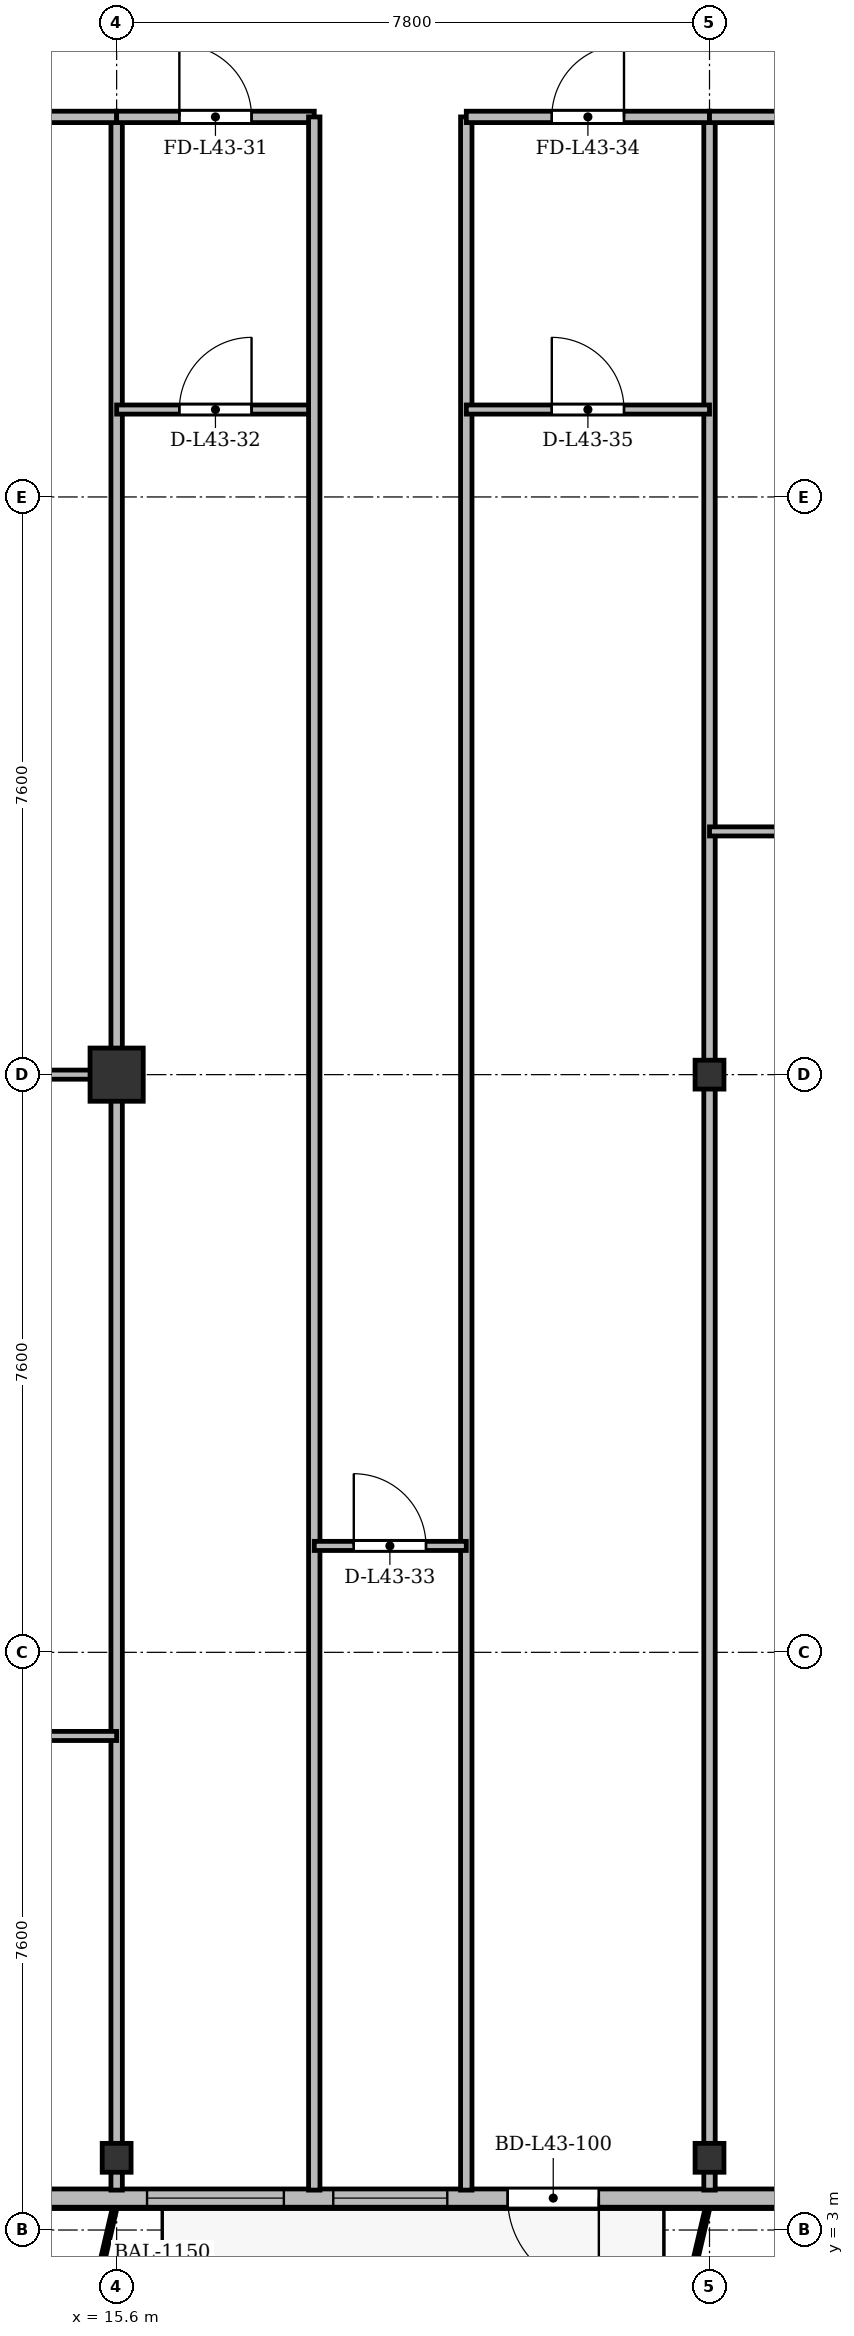
"""IFC4 building model, lengths in metres.
Left out: names, types, materials, properties, quantities, classifications, styles, units other than length and angle.
Written with IfcOpenShell. Run it as: python <this file> out.ifc"""

import sys

from ifc_helpers import new_model, si_unit, direction, frame, frame_2d, origin, origin_2d, place, context, subcontext, project, spatial, rectangle, i_section, extrude, source, transform, mapped, element, fill, save


model = new_model("IFC4")
c1 = context("Model", 3, precision=1e-05, world=origin(), true_north=direction((0.0, 1.0)))
c2 = subcontext(c1, "Body", "Model", "MODEL_VIEW")
j1 = project(units=[si_unit("LENGTHUNIT", "METRE"), si_unit("PLANEANGLEUNIT", "RADIAN")], contexts=[c1])
p1 = place(None, origin())
s1 = spatial("IfcSite", under=j1, at=p1, CompositionType="ELEMENT")
p2 = place(p1, origin())
s2 = spatial("IfcBuilding", under=s1, at=p2, CompositionType="ELEMENT")
p3 = place(p2, frame((0.0, 0.0, 164.5)))
s3 = spatial("IfcBuildingStorey", under=s2, at=p3, CompositionType="ELEMENT", Elevation=164.5)
m1 = source(origin(), c2, "Body", "SweptSolid", [
    extrude(i_section(OverallWidth=0.38, OverallDepth=0.38, WebThickness=0.02, FlangeThickness=0.03, at=origin_2d()), origin(), (0.0, 0.0, 1.0), 3.6),
])
p4 = place(p3, frame((15.6, 3.95, 0.0), z_axis=(0.0, 0.0, 1.0), x_axis=(1.0, 0.0, 0.0)))
e1 = element("IfcColumn", 1, at=p4, inside=s3, PredefinedType="COLUMN", context=c2, shape_type="MappedRepresentation", body=[
    mapped(m1, transform((0.0, 0.0, 0.0), x_axis=(1.0, 0.0, 0.0), y_axis=(0.0, 1.0, 0.0), z_axis=(0.0, 0.0, 1.0), scale=1.0)),
])
m2 = source(origin(), c2, "Body", "SweptSolid", [
    extrude(rectangle(XDim=0.7, YDim=0.7, at=origin_2d()), origin(), (0.0, 0.0, 1.0), 3.6),
])
p5 = place(p3, frame((15.6, 18.2, 0.0), z_axis=(0.0, 0.0, 1.0), x_axis=(1.0, 0.0, 0.0)))
e2 = element("IfcColumn", 2, at=p5, inside=s3, PredefinedType="COLUMN", context=c2, shape_type="MappedRepresentation", body=[
    mapped(m2, transform((0.0, 0.0, 0.0), x_axis=(1.0, 0.0, 0.0), y_axis=(0.0, 1.0, 0.0), z_axis=(0.0, 0.0, 1.0), scale=1.0)),
])
for number, where, z_axis, x_axis in (
    (3, (23.4, 3.95, 0.0), (0.0, 0.0, 1.0), (1.0, 0.0, 0.0)),
    (4, (23.4, 18.2, 0.0), (0.0, 0.0, 1.0), (1.0, 0.0, 0.0)),
):
    element("IfcColumn", number, at=place(p3, frame(where, z_axis=z_axis, x_axis=x_axis)), inside=s3, PredefinedType="COLUMN", context=c2, shape_type="MappedRepresentation", body=[
        mapped(m1, transform((0.0, 0.0, 0.0), x_axis=(1.0, 0.0, 0.0), y_axis=(0.0, 1.0, 0.0), z_axis=(0.0, 0.0, 1.0), scale=1.0)),
    ])
p6 = place(p3, frame((63.6, 3.42, 0.0), z_axis=(0.0, 0.0, 1.0), x_axis=(-1.0, 0.0, 0.0)))
e5 = element("IfcWall", 5, at=p6, inside=s3, PredefinedType="SOLIDWALL", context=c2, shape_type="SweptSolid", body=[
    extrude(rectangle(XDim=52.8, YDim=0.24, at=frame_2d((26.4, 0.0))), origin(), (0.0, 0.0, 1.0), 3.35),
])
p7 = place(p6, frame((1.445, 0.0, 0.9)))
e6 = element("IfcOpeningElement", 6, at=p7, cuts=e5, PredefinedType="OPENING", context=c2, shape_type="SweptSolid", body=[
    extrude(rectangle(XDim=2.0, YDim=1.95, at=frame_2d((1.0, 0.975))), frame((0.0, 0.13, 0.0), z_axis=(0.0, -1.0, 0.0), x_axis=(1.0, 0.0, 0.0)), (0.0, 0.0, 1.0), 0.26),
])
p8 = place(p6, frame((5.275, 0.0, 0.9)))
e7 = element("IfcOpeningElement", 7, at=p8, cuts=e5, PredefinedType="OPENING", context=c2, shape_type="SweptSolid", body=[
    extrude(rectangle(XDim=1.65, YDim=1.85, at=frame_2d((0.825, 0.925))), frame((0.0, 0.13, 0.0), z_axis=(0.0, -1.0, 0.0), x_axis=(1.0, 0.0, 0.0)), (0.0, 0.0, 1.0), 0.26),
])
p9 = place(p6, frame((7.65, 0.0, 0.9)))
e8 = element("IfcOpeningElement", 8, at=p9, cuts=e5, PredefinedType="OPENING", context=c2, shape_type="SweptSolid", body=[
    extrude(rectangle(XDim=1.5, YDim=1.75, at=frame_2d((0.75, 0.875))), frame((0.0, 0.13, 0.0), z_axis=(0.0, -1.0, 0.0), x_axis=(1.0, 0.0, 0.0)), (0.0, 0.0, 1.0), 0.26),
])
p10 = place(p6, frame((9.9, 0.0, 0.9)))
e9 = element("IfcOpeningElement", 9, at=p10, cuts=e5, PredefinedType="OPENING", context=c2, shape_type="SweptSolid", body=[
    extrude(rectangle(XDim=2.2, YDim=1.8, at=frame_2d((1.1, 0.9))), frame((0.0, 0.13, 0.0), z_axis=(0.0, -1.0, 0.0), x_axis=(1.0, 0.0, 0.0)), (0.0, 0.0, 1.0), 0.26),
])
p11 = place(p6, frame((13.62, 0.0, 0.0)))
e10 = element("IfcOpeningElement", 10, at=p11, cuts=e5, PredefinedType="OPENING", context=c2, shape_type="SweptSolid", body=[
    extrude(rectangle(XDim=1.2, YDim=2.2, at=frame_2d((0.6, 1.1))), frame((0.0, 0.13, 0.0), z_axis=(0.0, -1.0, 0.0), x_axis=(1.0, 0.0, 0.0)), (0.0, 0.0, 1.0), 0.26),
])
p12 = place(p6, frame((15.45, 0.0, 0.9)))
e11 = element("IfcOpeningElement", 11, at=p12, cuts=e5, PredefinedType="OPENING", context=c2, shape_type="SweptSolid", body=[
    extrude(rectangle(XDim=1.5, YDim=1.75, at=frame_2d((0.75, 0.875))), frame((0.0, 0.13, 0.0), z_axis=(0.0, -1.0, 0.0), x_axis=(1.0, 0.0, 0.0)), (0.0, 0.0, 1.0), 0.26),
])
p13 = place(p6, frame((17.775, 0.0, 0.9)))
e12 = element("IfcOpeningElement", 12, at=p13, cuts=e5, PredefinedType="OPENING", context=c2, shape_type="SweptSolid", body=[
    extrude(rectangle(XDim=1.65, YDim=1.85, at=frame_2d((0.825, 0.925))), frame((0.0, 0.13, 0.0), z_axis=(0.0, -1.0, 0.0), x_axis=(1.0, 0.0, 0.0)), (0.0, 0.0, 1.0), 0.26),
])
p14 = place(p6, frame((22.2, 0.0, 0.9)))
e13 = element("IfcOpeningElement", 13, at=p14, cuts=e5, PredefinedType="OPENING", context=c2, shape_type="SweptSolid", body=[
    extrude(rectangle(XDim=1.8, YDim=1.8, at=frame_2d((0.9, 0.9))), frame((0.0, 0.13, 0.0), z_axis=(0.0, -1.0, 0.0), x_axis=(1.0, 0.0, 0.0)), (0.0, 0.0, 1.0), 0.26),
])
p15 = place(p6, frame((28.6, 0.0, 0.9)))
e14 = element("IfcOpeningElement", 14, at=p15, cuts=e5, PredefinedType="OPENING", context=c2, shape_type="SweptSolid", body=[
    extrude(rectangle(XDim=2.2, YDim=1.8, at=frame_2d((1.1, 0.9))), frame((0.0, 0.13, 0.0), z_axis=(0.0, -1.0, 0.0), x_axis=(1.0, 0.0, 0.0)), (0.0, 0.0, 1.0), 0.26),
])
p16 = place(p6, frame((35.85, 0.0, 0.9)))
e15 = element("IfcOpeningElement", 15, at=p16, cuts=e5, PredefinedType="OPENING", context=c2, shape_type="SweptSolid", body=[
    extrude(rectangle(XDim=1.5, YDim=1.75, at=frame_2d((0.75, 0.875))), frame((0.0, 0.13, 0.0), z_axis=(0.0, -1.0, 0.0), x_axis=(1.0, 0.0, 0.0)), (0.0, 0.0, 1.0), 0.26),
])
p17 = place(p6, frame((41.656, 0.0, 0.0)))
e16 = element("IfcOpeningElement", 16, at=p17, cuts=e5, PredefinedType="OPENING", context=c2, shape_type="SweptSolid", body=[
    extrude(rectangle(XDim=1.2, YDim=2.2, at=frame_2d((0.6, 1.1))), frame((0.0, 0.13, 0.0), z_axis=(0.0, -1.0, 0.0), x_axis=(1.0, 0.0, 0.0)), (0.0, 0.0, 1.0), 0.26),
])
p18 = place(p6, frame((43.65, 0.0, 0.9)))
e17 = element("IfcOpeningElement", 17, at=p18, cuts=e5, PredefinedType="OPENING", context=c2, shape_type="SweptSolid", body=[
    extrude(rectangle(XDim=1.5, YDim=1.75, at=frame_2d((0.75, 0.875))), frame((0.0, 0.13, 0.0), z_axis=(0.0, -1.0, 0.0), x_axis=(1.0, 0.0, 0.0)), (0.0, 0.0, 1.0), 0.26),
])
p19 = place(p6, frame((45.8, 0.0, 0.9)))
e18 = element("IfcOpeningElement", 18, at=p19, cuts=e5, PredefinedType="OPENING", context=c2, shape_type="SweptSolid", body=[
    extrude(rectangle(XDim=1.8, YDim=1.8, at=frame_2d((0.9, 0.9))), frame((0.0, 0.13, 0.0), z_axis=(0.0, -1.0, 0.0), x_axis=(1.0, 0.0, 0.0)), (0.0, 0.0, 1.0), 0.26),
])
p20 = place(p6, frame((49.255, 0.0, 0.9)))
e19 = element("IfcOpeningElement", 19, at=p20, cuts=e5, PredefinedType="OPENING", context=c2, shape_type="SweptSolid", body=[
    extrude(rectangle(XDim=2.2, YDim=1.8, at=frame_2d((1.1, 0.9))), frame((0.0, 0.13, 0.0), z_axis=(0.0, -1.0, 0.0), x_axis=(1.0, 0.0, 0.0)), (0.0, 0.0, 1.0), 0.26),
])
for number, where, z_axis, x_axis in (
    (20, (15.6, 3.525, 0.0), (0.0, 0.0, 1.0), (0.0, 1.0, 0.0)),
    (21, (23.4, 3.525, 0.0), (0.0, 0.0, 1.0), (0.0, 1.0, 0.0)),
):
    element("IfcWall", number, at=place(p3, frame(where, z_axis=z_axis, x_axis=x_axis)), inside=s3, PredefinedType="PARTITIONING", context=c2, shape_type="SweptSolid", body=[
        extrude(rectangle(XDim=27.275, YDim=0.15, at=frame_2d((13.638, 0.0))), origin(), (0.0, 0.0, 1.0), 2.85),
    ])
p21 = place(p3, frame((8.04, 18.2, 0.0), z_axis=(0.0, 0.0, 1.0), x_axis=(1.0, 0.0, 0.0)))
e22 = element("IfcWall", 22, at=p21, inside=s3, PredefinedType="PARTITIONING", context=c2, shape_type="SweptSolid", body=[
    extrude(rectangle(XDim=7.56, YDim=0.12, at=frame_2d((3.78, 0.0))), origin(), (0.0, 0.0, 1.0), 2.75),
])
p22 = place(p21, frame((3.305, 0.0, 0.0)))
e23 = element("IfcOpeningElement", 23, at=p22, cuts=e22, PredefinedType="OPENING", context=c2, shape_type="SweptSolid", body=[
    extrude(rectangle(XDim=0.95, YDim=2.15, at=frame_2d((0.475, 1.075))), frame((0.0, 0.07, 0.0), z_axis=(0.0, -1.0, 0.0), x_axis=(1.0, 0.0, 0.0)), (0.0, 0.0, 1.0), 0.14),
])
p23 = place(p3, frame((8.025, 30.8, 0.0), z_axis=(0.0, 0.0, 1.0), x_axis=(1.0, 0.0, 0.0)))
e24 = element("IfcWall", 24, at=p23, inside=s3, PredefinedType="PARTITIONING", context=c2, shape_type="SweptSolid", body=[
    extrude(rectangle(XDim=7.575, YDim=0.15, at=frame_2d((3.788, 0.0))), origin(), (0.0, 0.0, 1.0), 2.85),
])
p24 = place(p23, frame((5.073, 0.0, 0.0)))
e25 = element("IfcOpeningElement", 25, at=p24, cuts=e24, PredefinedType="OPENING", context=c2, shape_type="SweptSolid", body=[
    extrude(rectangle(XDim=0.95, YDim=2.15, at=frame_2d((0.475, 1.075))), frame((0.0, 0.085, 0.0), z_axis=(0.0, -1.0, 0.0), x_axis=(1.0, 0.0, 0.0)), (0.0, 0.0, 1.0), 0.17),
])
p25 = place(p3, frame((8.04, 9.5, 0.0), z_axis=(0.0, 0.0, 1.0), x_axis=(1.0, 0.0, 0.0)))
e26 = element("IfcWall", 26, at=p25, inside=s3, PredefinedType="PARTITIONING", context=c2, shape_type="SweptSolid", body=[
    extrude(rectangle(XDim=7.56, YDim=0.12, at=frame_2d((3.78, 0.0))), origin(), (0.0, 0.0, 1.0), 2.85),
])
p26 = place(p25, frame((3.305, 0.0, 0.0)))
e27 = element("IfcOpeningElement", 27, at=p26, cuts=e26, PredefinedType="OPENING", context=c2, shape_type="SweptSolid", body=[
    extrude(rectangle(XDim=0.95, YDim=2.15, at=frame_2d((0.475, 1.075))), frame((0.0, 0.07, 0.0), z_axis=(0.0, -1.0, 0.0), x_axis=(1.0, 0.0, 0.0)), (0.0, 0.0, 1.0), 0.14),
])
p27 = place(p3, frame((15.6, 30.8, 0.0), z_axis=(0.0, 0.0, 1.0), x_axis=(1.0, 0.0, 0.0)))
e28 = element("IfcWall", 28, at=p27, inside=s3, PredefinedType="PARTITIONING", context=c2, shape_type="SweptSolid", body=[
    extrude(rectangle(XDim=2.6, YDim=0.15, at=frame_2d((1.3, 0.0))), origin(), (0.0, 0.0, 1.0), 2.85),
])
p28 = place(p27, frame((0.825, 0.0, 0.0)))
e29 = element("IfcOpeningElement", 29, at=p28, cuts=e28, PredefinedType="OPENING", context=c2, shape_type="SweptSolid", body=[
    extrude(rectangle(XDim=0.95, YDim=2.15, at=frame_2d((0.475, 1.075))), frame((0.0, 0.085, 0.0), z_axis=(0.0, -1.0, 0.0), x_axis=(1.0, 0.0, 0.0)), (0.0, 0.0, 1.0), 0.17),
])
p29 = place(p3, frame((15.6, 26.95, 0.0), z_axis=(0.0, 0.0, 1.0), x_axis=(1.0, 0.0, 0.0)))
e30 = element("IfcWall", 30, at=p29, inside=s3, PredefinedType="PARTITIONING", context=c2, shape_type="SweptSolid", body=[
    extrude(rectangle(XDim=2.6, YDim=0.12, at=frame_2d((1.3, 0.0))), origin(), (0.0, 0.0, 1.0), 2.85),
])
p30 = place(p29, frame((0.825, 0.0, 0.0)))
e31 = element("IfcOpeningElement", 31, at=p30, cuts=e30, PredefinedType="OPENING", context=c2, shape_type="SweptSolid", body=[
    extrude(rectangle(XDim=0.95, YDim=2.15, at=frame_2d((0.475, 1.075))), frame((0.0, 0.07, 0.0), z_axis=(0.0, -1.0, 0.0), x_axis=(1.0, 0.0, 0.0)), (0.0, 0.0, 1.0), 0.14),
])
for number, where, z_axis, x_axis in (
    (32, (18.2, 3.525, 0.0), (0.0, 0.0, 1.0), (0.0, 1.0, 0.0)),
    (33, (20.2, 3.525, 0.0), (0.0, 0.0, 1.0), (0.0, 1.0, 0.0)),
):
    element("IfcWall", number, at=place(p3, frame(where, z_axis=z_axis, x_axis=x_axis)), inside=s3, PredefinedType="PARTITIONING", context=c2, shape_type="SweptSolid", body=[
        extrude(rectangle(XDim=27.275, YDim=0.15, at=frame_2d((13.638, 0.0))), origin(), (0.0, 0.0, 1.0), 2.75),
    ])
p31 = place(p3, frame((18.2, 12.0, 0.0), z_axis=(0.0, 0.0, 1.0), x_axis=(1.0, 0.0, 0.0)))
e34 = element("IfcWall", 34, at=p31, inside=s3, PredefinedType="PARTITIONING", context=c2, shape_type="SweptSolid", body=[
    extrude(rectangle(XDim=2.0, YDim=0.12, at=frame_2d((1.0, 0.0))), origin(), (0.0, 0.0, 1.0), 3.35),
])
p32 = place(p31, frame((0.52, 0.0, 0.0)))
e35 = element("IfcOpeningElement", 35, at=p32, cuts=e34, PredefinedType="OPENING", context=c2, shape_type="SweptSolid", body=[
    extrude(rectangle(XDim=0.95, YDim=2.15, at=frame_2d((0.475, 1.075))), frame((0.0, 0.07, 0.0), z_axis=(0.0, -1.0, 0.0), x_axis=(1.0, 0.0, 0.0)), (0.0, 0.0, 1.0), 0.14),
])
p33 = place(p3, frame((20.2, 30.8, 0.0), z_axis=(0.0, 0.0, 1.0), x_axis=(1.0, 0.0, 0.0)))
e36 = element("IfcWall", 36, at=p33, inside=s3, PredefinedType="PARTITIONING", context=c2, shape_type="SweptSolid", body=[
    extrude(rectangle(XDim=3.2, YDim=0.15, at=frame_2d((1.6, 0.0))), origin(), (0.0, 0.0, 1.0), 2.85),
])
p34 = place(p33, frame((1.125, 0.0, 0.0)))
e37 = element("IfcOpeningElement", 37, at=p34, cuts=e36, PredefinedType="OPENING", context=c2, shape_type="SweptSolid", body=[
    extrude(rectangle(XDim=0.95, YDim=2.15, at=frame_2d((0.475, 1.075))), frame((0.0, 0.085, 0.0), z_axis=(0.0, -1.0, 0.0), x_axis=(1.0, 0.0, 0.0)), (0.0, 0.0, 1.0), 0.17),
])
p35 = place(p3, frame((20.2, 26.95, 0.0), z_axis=(0.0, 0.0, 1.0), x_axis=(1.0, 0.0, 0.0)))
e38 = element("IfcWall", 38, at=p35, inside=s3, PredefinedType="PARTITIONING", context=c2, shape_type="SweptSolid", body=[
    extrude(rectangle(XDim=3.2, YDim=0.12, at=frame_2d((1.6, 0.0))), origin(), (0.0, 0.0, 1.0), 2.85),
])
p36 = place(p35, frame((1.125, 0.0, 0.0)))
e39 = element("IfcOpeningElement", 39, at=p36, cuts=e38, PredefinedType="OPENING", context=c2, shape_type="SweptSolid", body=[
    extrude(rectangle(XDim=0.95, YDim=2.15, at=frame_2d((0.475, 1.075))), frame((0.0, 0.07, 0.0), z_axis=(0.0, -1.0, 0.0), x_axis=(1.0, 0.0, 0.0)), (0.0, 0.0, 1.0), 0.14),
])
p37 = place(p3, frame((23.4, 30.8, 0.0), z_axis=(0.0, 0.0, 1.0), x_axis=(1.0, 0.0, 0.0)))
e40 = element("IfcWall", 40, at=p37, inside=s3, PredefinedType="PARTITIONING", context=c2, shape_type="SweptSolid", body=[
    extrude(rectangle(XDim=7.2, YDim=0.15, at=frame_2d((3.6, 0.0))), origin(), (0.0, 0.0, 1.0), 2.85),
])
p38 = place(p37, frame((3.125, 0.0, 0.0)))
e41 = element("IfcOpeningElement", 41, at=p38, cuts=e40, PredefinedType="OPENING", context=c2, shape_type="SweptSolid", body=[
    extrude(rectangle(XDim=0.95, YDim=2.15, at=frame_2d((0.475, 1.075))), frame((0.0, 0.085, 0.0), z_axis=(0.0, -1.0, 0.0), x_axis=(1.0, 0.0, 0.0)), (0.0, 0.0, 1.0), 0.17),
])
p39 = place(p3, frame((23.4, 21.4, 0.0), z_axis=(0.0, 0.0, 1.0), x_axis=(1.0, 0.0, 0.0)))
e42 = element("IfcWall", 42, at=p39, inside=s3, PredefinedType="PARTITIONING", context=c2, shape_type="SweptSolid", body=[
    extrude(rectangle(XDim=7.2, YDim=0.12, at=frame_2d((3.6, 0.0))), origin(), (0.0, 0.0, 1.0), 2.85),
])
p40 = place(p39, frame((3.125, 0.0, 0.0)))
e43 = element("IfcOpeningElement", 43, at=p40, cuts=e42, PredefinedType="OPENING", context=c2, shape_type="SweptSolid", body=[
    extrude(rectangle(XDim=0.95, YDim=2.15, at=frame_2d((0.475, 1.075))), frame((0.0, 0.07, 0.0), z_axis=(0.0, -1.0, 0.0), x_axis=(1.0, 0.0, 0.0)), (0.0, 0.0, 1.0), 0.14),
])
m3 = source(origin(), c2, "Body", "SweptSolid", [
    extrude(rectangle(XDim=1.2, YDim=2.2, at=frame_2d((0.6, 1.1))), frame((0.0, 0.025, 0.0), z_axis=(0.0, -1.0, 0.0), x_axis=(1.0, 0.0, 0.0)), (0.0, 0.0, 1.0), 0.05),
])
p41 = place(p17, origin())
e44 = element("IfcDoor", 44, at=p41, inside=s3, OperationType="SINGLE_SWING_LEFT", PredefinedType="DOOR", context=c2, shape_type="MappedRepresentation", body=[
    mapped(m3, transform((0.0, 0.0, 0.0), x_axis=(1.0, 0.0, 0.0), y_axis=(0.0, 1.0, 0.0), z_axis=(0.0, 0.0, 1.0), scale=1.0)),
])
fill(e16, e44)
m4 = source(origin(), c2, "Body", "SweptSolid", [
    extrude(rectangle(XDim=1.5, YDim=1.75, at=frame_2d((0.75, 0.875))), frame((0.0, 0.03, 0.0), z_axis=(0.0, -1.0, 0.0), x_axis=(1.0, 0.0, 0.0)), (0.0, 0.0, 1.0), 0.06),
])
p42 = place(p18, origin())
e45 = element("IfcWindow", 45, at=p42, inside=s3, PartitioningType="SINGLE_PANEL", PredefinedType="WINDOW", context=c2, shape_type="MappedRepresentation", body=[
    mapped(m4, transform((0.0, 0.0, 0.0), x_axis=(1.0, 0.0, 0.0), y_axis=(0.0, 1.0, 0.0), z_axis=(0.0, 0.0, 1.0), scale=1.0)),
])
fill(e17, e45)
m5 = source(origin(), c2, "Body", "SweptSolid", [
    extrude(rectangle(XDim=1.8, YDim=1.8, at=frame_2d((0.9, 0.9))), frame((0.0, 0.03, 0.0), z_axis=(0.0, -1.0, 0.0), x_axis=(1.0, 0.0, 0.0)), (0.0, 0.0, 1.0), 0.06),
])
p43 = place(p19, origin())
e46 = element("IfcWindow", 46, at=p43, inside=s3, PartitioningType="SINGLE_PANEL", PredefinedType="WINDOW", context=c2, shape_type="MappedRepresentation", body=[
    mapped(m5, transform((0.0, 0.0, 0.0), x_axis=(1.0, 0.0, 0.0), y_axis=(0.0, 1.0, 0.0), z_axis=(0.0, 0.0, 1.0), scale=1.0)),
])
fill(e18, e46)
m6 = source(origin(), c2, "Body", "SweptSolid", [
    extrude(rectangle(XDim=0.95, YDim=2.15, at=frame_2d((0.475, 1.075))), frame((0.0, 0.025, 0.0), z_axis=(0.0, -1.0, 0.0), x_axis=(1.0, 0.0, 0.0)), (0.0, 0.0, 1.0), 0.05),
])
p44 = place(p28, origin())
e47 = element("IfcDoor", 47, at=p44, inside=s3, OperationType="SINGLE_SWING_LEFT", PredefinedType="DOOR", context=c2, shape_type="MappedRepresentation", body=[
    mapped(m6, transform((0.0, 0.0, 0.0), x_axis=(1.0, 0.0, 0.0), y_axis=(0.0, 1.0, 0.0), z_axis=(0.0, 0.0, 1.0), scale=1.0)),
])
fill(e29, e47)
p45 = place(p30, origin())
e48 = element("IfcDoor", 48, at=p45, inside=s3, OperationType="SINGLE_SWING_RIGHT", PredefinedType="DOOR", context=c2, shape_type="MappedRepresentation", body=[
    mapped(m6, transform((0.0, 0.0, 0.0), x_axis=(1.0, 0.0, 0.0), y_axis=(0.0, 1.0, 0.0), z_axis=(0.0, 0.0, 1.0), scale=1.0)),
])
fill(e31, e48)
p46 = place(p32, origin())
e49 = element("IfcDoor", 49, at=p46, inside=s3, OperationType="SINGLE_SWING_LEFT", PredefinedType="DOOR", context=c2, shape_type="MappedRepresentation", body=[
    mapped(m6, transform((0.0, 0.0, 0.0), x_axis=(1.0, 0.0, 0.0), y_axis=(0.0, 1.0, 0.0), z_axis=(0.0, 0.0, 1.0), scale=1.0)),
])
fill(e35, e49)
p47 = place(p34, origin())
e50 = element("IfcDoor", 50, at=p47, inside=s3, OperationType="SINGLE_SWING_RIGHT", PredefinedType="DOOR", context=c2, shape_type="MappedRepresentation", body=[
    mapped(m6, transform((0.0, 0.0, 0.0), x_axis=(1.0, 0.0, 0.0), y_axis=(0.0, 1.0, 0.0), z_axis=(0.0, 0.0, 1.0), scale=1.0)),
])
fill(e37, e50)
p48 = place(p36, origin())
e51 = element("IfcDoor", 51, at=p48, inside=s3, OperationType="SINGLE_SWING_LEFT", PredefinedType="DOOR", context=c2, shape_type="MappedRepresentation", body=[
    mapped(m6, transform((0.0, 0.0, 0.0), x_axis=(1.0, 0.0, 0.0), y_axis=(0.0, 1.0, 0.0), z_axis=(0.0, 0.0, 1.0), scale=1.0)),
])
fill(e39, e51)
save(model, sys.argv[1])
